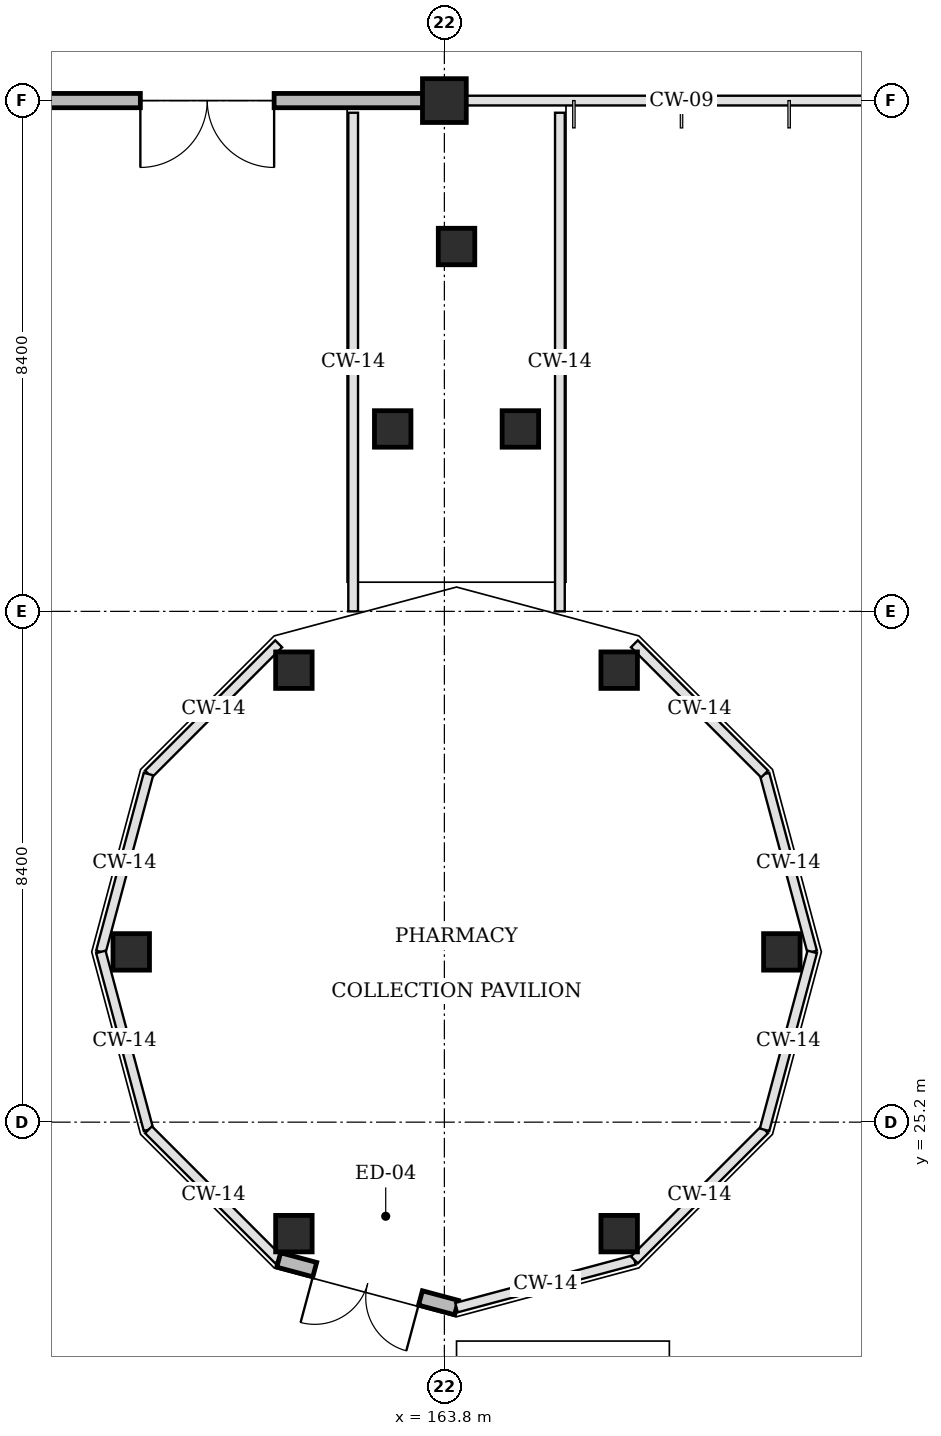
"""IFC4 building model, lengths in metres.
Left out: names, types, materials, properties, quantities, classifications, styles, units other than length and angle.
Written with IfcOpenShell. Run it as: python <this file> out.ifc"""

import sys

from ifc_helpers import new_model, si_unit, direction, frame, frame_2d, origin, origin_2d, place, context, subcontext, project, spatial, rectangle, circle, extrude, element, fill, save


model = new_model("IFC4")
c1 = context("Model", 3, precision=1e-05, world=origin(), true_north=direction((0.0, 1.0)))
c2 = subcontext(c1, "Body", "Model", "MODEL_VIEW")
j1 = project(units=[si_unit("LENGTHUNIT", "METRE"), si_unit("PLANEANGLEUNIT", "RADIAN")], contexts=[c1])
p1 = place(None, origin())
s1 = spatial("IfcSite", under=j1, at=p1, CompositionType="ELEMENT")
p2 = place(p1, origin())
s2 = spatial("IfcBuilding", under=s1, at=p2, CompositionType="ELEMENT")
p3 = place(p2, origin())
s3 = spatial("IfcBuildingStorey", under=s2, at=p3, CompositionType="ELEMENT", Elevation=0.0)
p4 = place(p3, frame((163.8, 42.0, 0.0), z_axis=(0.0, 0.0, 1.0), x_axis=(1.0, 0.0, 0.0)))
e1 = element("IfcColumn", 1, at=p4, inside=s3, PredefinedType="COLUMN", context=c2, shape_type="SweptSolid", body=[
    extrude(rectangle(XDim=0.72, YDim=0.72, at=origin_2d()), origin(), (0.0, 0.0, 1.0), 4.8),
])
for number, where, z_axis, x_axis in (
    (2, (169.35, 28.0, -0.3), (0.0, 0.0, 1.0), (1.0, 0.0, 0.0)),
    (3, (166.675, 32.633, -0.3), (0.0, 0.0, 1.0), (1.0, 0.0, 0.0)),
    (4, (161.325, 32.633, -0.3), (0.0, 0.0, 1.0), (1.0, 0.0, 0.0)),
    (5, (158.65, 28.0, -0.3), (0.0, 0.0, 1.0), (1.0, 0.0, 0.0)),
    (6, (161.325, 23.367, -0.3), (0.0, 0.0, 1.0), (1.0, 0.0, 0.0)),
    (7, (166.675, 23.367, -0.3), (0.0, 0.0, 1.0), (1.0, 0.0, 0.0)),
):
    element("IfcColumn", number, at=place(p3, frame(where, z_axis=z_axis, x_axis=x_axis)), inside=s3, PredefinedType="PILASTER", context=c2, shape_type="SweptSolid", body=[
        extrude(circle(Radius=0.3, at=origin_2d()), origin(), (0.0, 0.0, 1.0), 4.84),
    ])
for number, where, z_axis, x_axis in (
    (8, (162.95, 36.6, -0.3), (0.0, 0.0, 1.0), (1.0, 0.0, 0.0)),
    (9, (165.05, 36.6, -0.3), (0.0, 0.0, 1.0), (1.0, 0.0, 0.0)),
    (10, (164.0, 39.6, -0.3), (0.0, 0.0, 1.0), (1.0, 0.0, 0.0)),
):
    element("IfcColumn", number, at=place(p3, frame(where, z_axis=z_axis, x_axis=x_axis)), inside=s3, PredefinedType="PILASTER", context=c2, shape_type="SweptSolid", body=[
        extrude(circle(Radius=0.3, at=origin_2d()), origin(), (0.0, 0.0, 1.0), 4.58),
    ])
p5 = place(p3, frame((163.46, 42.0, 0.0), z_axis=(0.0, 0.0, 1.0), x_axis=(-1.0, 0.0, 0.0)))
e11 = element("IfcWall", 11, at=p5, inside=s3, PredefinedType="STANDARD", context=c2, shape_type="SweptSolid", body=[
    extrude(rectangle(XDim=7.12, YDim=0.235, at=frame_2d((3.56, 0.0))), origin(), (0.0, 0.0, 1.0), 3.63),
])
p6 = place(p5, frame((2.46, 0.0, 0.0)))
e12 = element("IfcOpeningElement", 12, at=p6, cuts=e11, PredefinedType="OPENING", context=c2, shape_type="SweptSolid", body=[
    extrude(rectangle(XDim=2.2, YDim=2.35, at=frame_2d((1.1, 1.175))), frame((0.0, 0.127, 0.0), z_axis=(0.0, -1.0, 0.0), x_axis=(1.0, 0.0, 0.0)), (0.0, 0.0, 1.0), 0.255),
])
p7 = place(p3, frame((164.0, 22.15, 0.0), z_axis=(0.0, 0.0, 1.0), x_axis=(-0.965911701678, 0.258871753116, 0.0)))
e13 = element("IfcWall", 13, at=p7, inside=s3, PredefinedType="STANDARD", context=c2, shape_type="SweptSolid", body=[
    extrude(rectangle(XDim=3.028, YDim=0.245, at=frame_2d((1.514, 0.0))), origin(), (0.0, 0.0, 1.0), 3.63),
])
p8 = place(p7, frame((0.614, 0.0, 0.0)))
e14 = element("IfcOpeningElement", 14, at=p8, cuts=e13, PredefinedType="OPENING", context=c2, shape_type="SweptSolid", body=[
    extrude(rectangle(XDim=1.8, YDim=2.25, at=frame_2d((0.9, 1.125))), frame((0.0, 0.133, 0.0), z_axis=(0.0, -1.0, 0.0), x_axis=(1.0, 0.0, 0.0)), (0.0, 0.0, 1.0), 0.265),
])
p9 = place(p6, origin())
e15 = element("IfcDoor", 15, at=p9, inside=s3, OperationType="DOUBLE_DOOR_SINGLE_SWING", PredefinedType="DOOR", context=c2, shape_type="SweptSolid", body=[
    extrude(rectangle(XDim=2.2, YDim=2.35, at=frame_2d((1.1, 1.175))), frame((0.0, 0.025, 0.0), z_axis=(0.0, -1.0, 0.0), x_axis=(1.0, 0.0, 0.0)), (0.0, 0.0, 1.0), 0.05),
])
fill(e12, e15)
p10 = place(p8, origin())
e16 = element("IfcDoor", 16, at=p10, inside=s3, OperationType="DOUBLE_DOOR_SINGLE_SWING", PredefinedType="DOOR", context=c2, shape_type="SweptSolid", body=[
    extrude(rectangle(XDim=1.8, YDim=2.25, at=frame_2d((0.9, 1.125))), frame((0.0, 0.025, 0.0), z_axis=(0.0, -1.0, 0.0), x_axis=(1.0, 0.0, 0.0)), (0.0, 0.0, 1.0), 0.05),
])
fill(e14, e16)
save(model, sys.argv[1])
